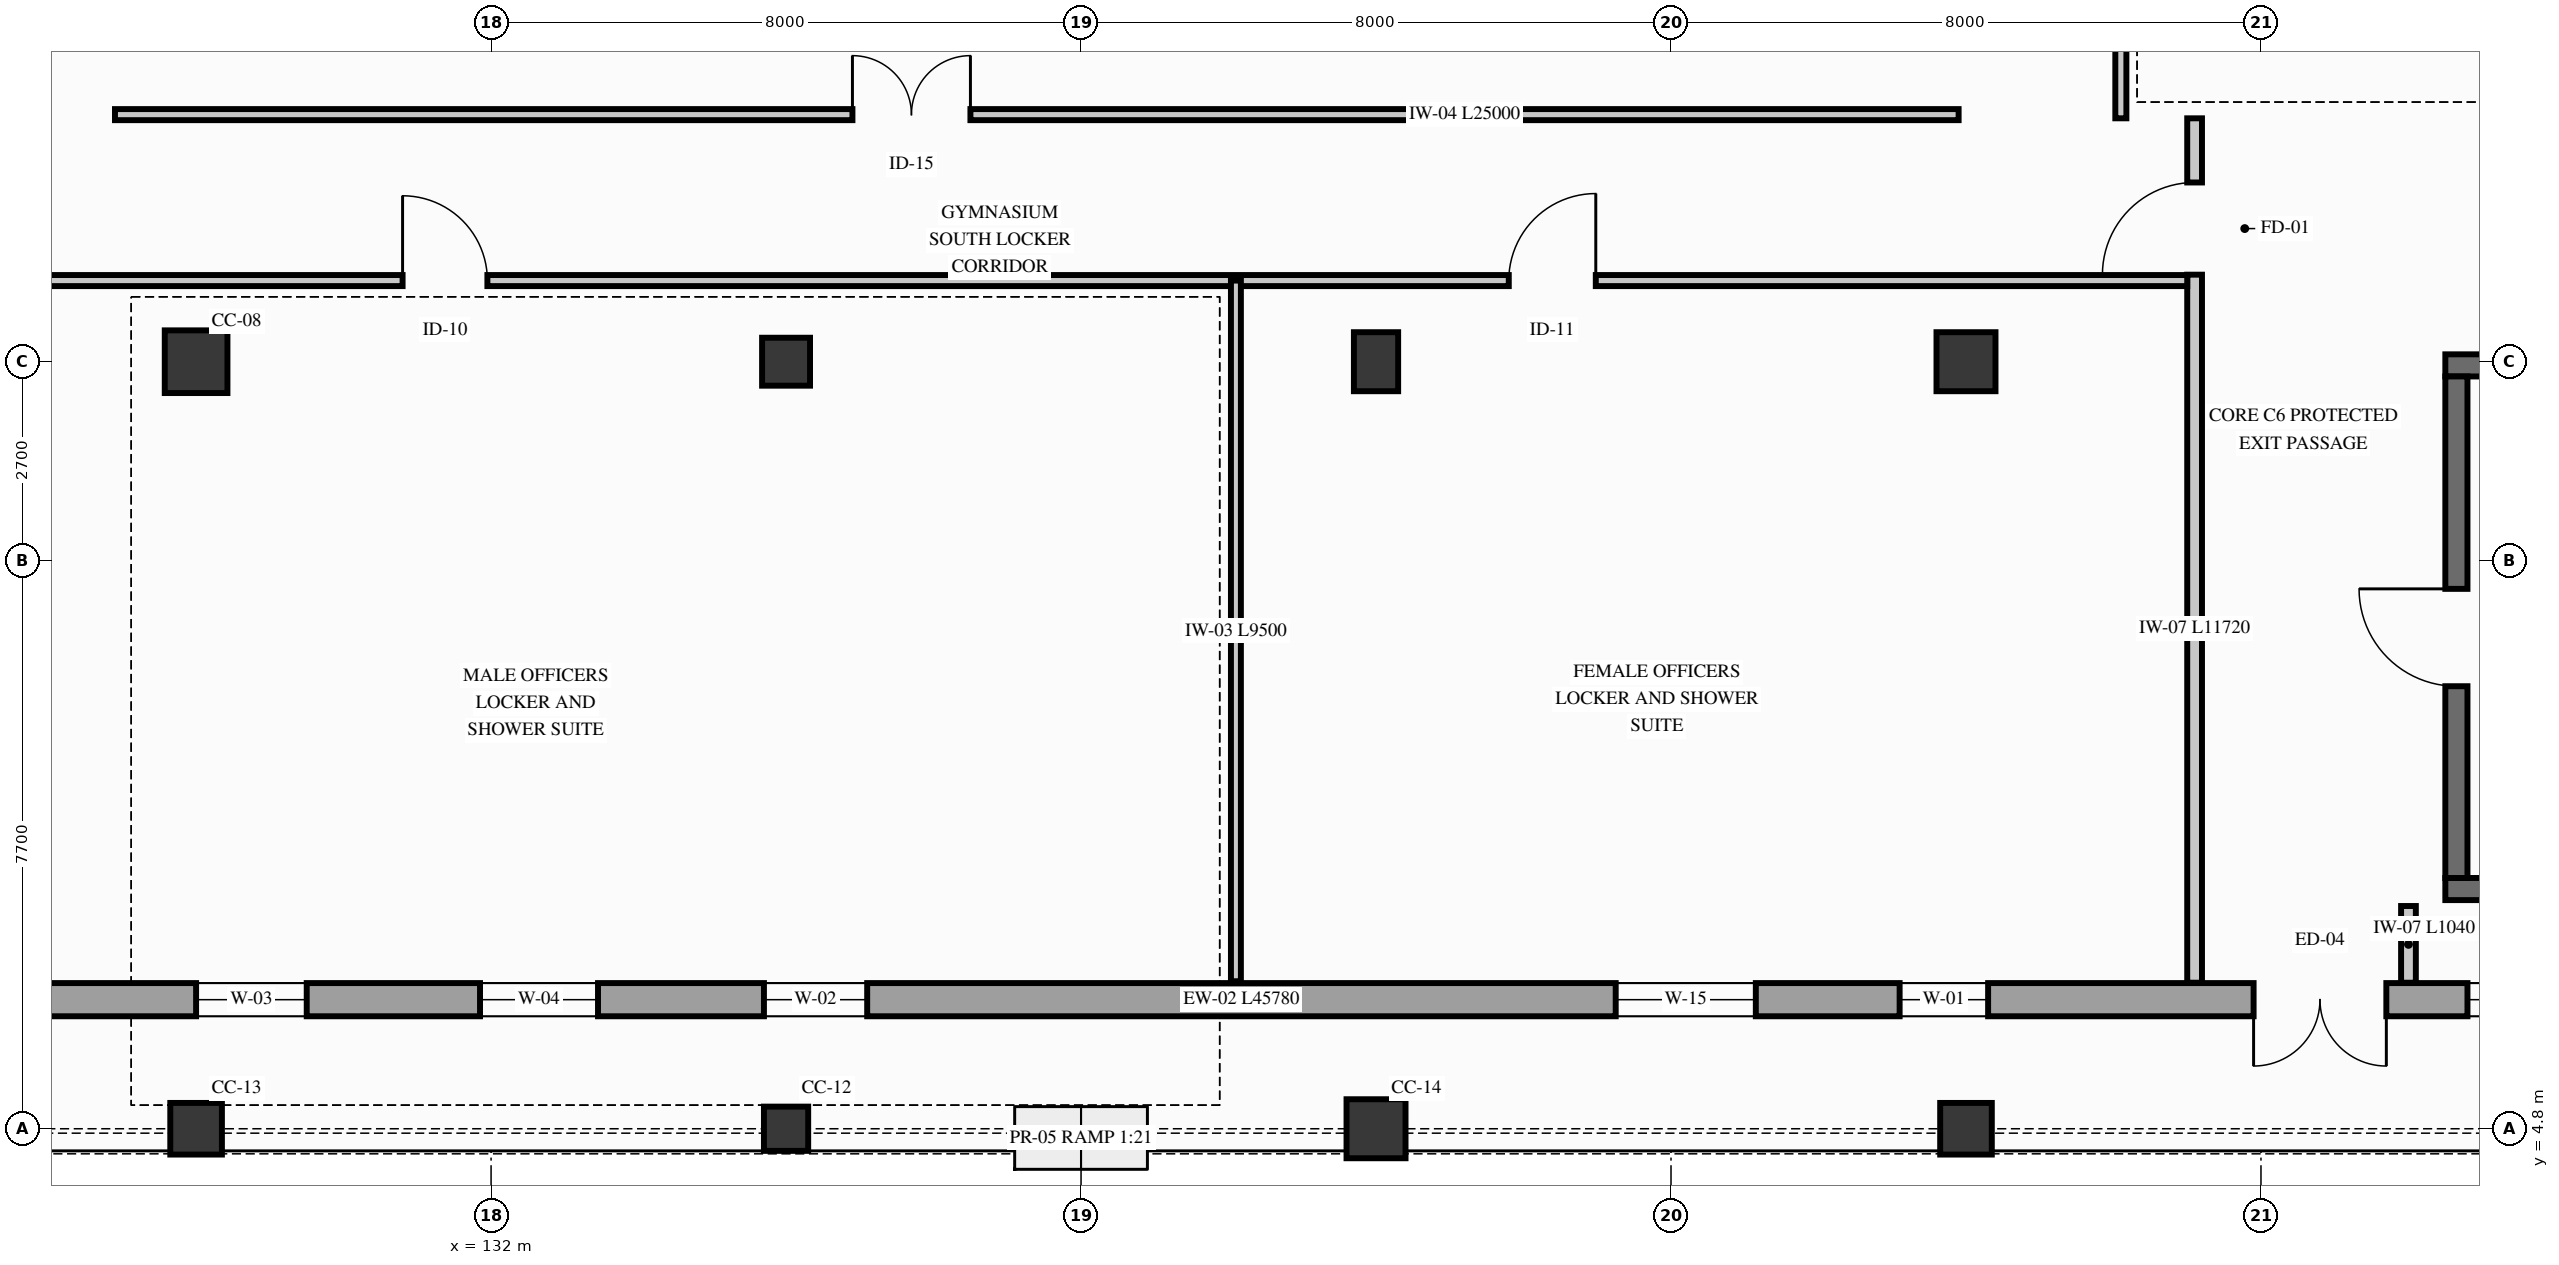
"""IFC4 building model, lengths in metres.
Left out: names, types, materials, properties, quantities, classifications, styles, units other than length and angle.
Written with IfcOpenShell. Run it as: python <this file> out.ifc"""

import sys

from ifc_helpers import new_model, si_unit, direction, frame, frame_2d, origin, origin_2d, place, context, subcontext, project, spatial, rectangle, circle, extrude, element, fill, save


model = new_model("IFC4")
c1 = context("Model", 3, precision=1e-05, world=origin(), true_north=direction((0.0, 1.0)))
c2 = subcontext(c1, "Body", "Model", "MODEL_VIEW")
j1 = project(units=[si_unit("LENGTHUNIT", "METRE"), si_unit("PLANEANGLEUNIT", "RADIAN")], contexts=[c1])
p1 = place(None, origin())
s1 = spatial("IfcSite", under=j1, at=p1, CompositionType="ELEMENT")
p2 = place(p1, origin())
s2 = spatial("IfcBuilding", under=s1, at=p2, CompositionType="ELEMENT")
p3 = place(p2, origin())
s3 = spatial("IfcBuildingStorey", under=s2, at=p3, CompositionType="ELEMENT", Elevation=0.0)
for number, where, z_axis, x_axis in (
    (1, (158.5, 8.05, 0.0), (0.0, 0.0, 1.0), (1.0, 0.0, 0.0)),
    (2, (158.5, 15.15, 0.0), (0.0, 0.0, 1.0), (1.0, 0.0, 0.0)),
):
    element("IfcWall", number, at=place(p3, frame(where, z_axis=z_axis, x_axis=x_axis)), inside=s3, PredefinedType="SHEAR", context=c2, shape_type="SweptSolid", body=[
        extrude(rectangle(XDim=8.2, YDim=0.3, at=frame_2d((4.1, 0.0))), origin(), (0.0, 0.0, 1.0), 4.88),
    ])
p4 = place(p3, frame((158.65, 8.2, 0.0), z_axis=(0.0, 0.0, 1.0), x_axis=(0.0, 1.0, 0.0)))
e3 = element("IfcWall", 3, at=p4, inside=s3, PredefinedType="SHEAR", context=c2, shape_type="SweptSolid", body=[
    extrude(rectangle(XDim=6.8, YDim=0.3, at=frame_2d((3.4, 0.0))), origin(), (0.0, 0.0, 1.0), 4.88),
])
p5 = place(p4, frame((2.6, 0.0, 0.0)))
e4 = element("IfcOpeningElement", 4, at=p5, cuts=e3, PredefinedType="OPENING", context=c2, shape_type="SweptSolid", body=[
    extrude(rectangle(XDim=1.32, YDim=2.24, at=frame_2d((0.66, 1.12))), frame((0.0, 0.16, 0.0), z_axis=(0.0, -1.0, 0.0), x_axis=(1.0, 0.0, 0.0)), (0.0, 0.0, 1.0), 0.32),
])
p6 = place(p3, frame((128.0, 4.8, 0.0), z_axis=(0.0, 0.0, 1.0), x_axis=(1.0, 0.0, 0.0)))
e5 = element("IfcColumn", 5, at=p6, inside=s3, PredefinedType="COLUMN", context=c2, shape_type="SweptSolid", body=[
    extrude(circle(Radius=0.35, at=origin_2d()), origin(), (0.0, 0.0, 1.0), 5.1),
])
p7 = place(p3, frame((128.0, 15.2, 0.0), z_axis=(0.0, 0.0, 1.0), x_axis=(1.0, 0.0, 0.0)))
e6 = element("IfcColumn", 6, at=p7, inside=s3, PredefinedType="COLUMN", context=c2, shape_type="SweptSolid", body=[
    extrude(rectangle(XDim=0.85, YDim=0.85, at=origin_2d()), origin(), (0.0, 0.0, 1.0), 5.1),
])
p8 = place(p3, frame((136.0, 4.8, 0.0), z_axis=(0.0, 0.0, 1.0), x_axis=(1.0, 0.0, 0.0)))
e7 = element("IfcColumn", 7, at=p8, inside=s3, PredefinedType="COLUMN", context=c2, shape_type="SweptSolid", body=[
    extrude(circle(Radius=0.3, at=origin_2d()), origin(), (0.0, 0.0, 1.0), 5.1),
])
p9 = place(p3, frame((136.0, 15.2, 0.0), z_axis=(0.0, 0.0, 1.0), x_axis=(1.0, 0.0, 0.0)))
e8 = element("IfcColumn", 8, at=p9, inside=s3, PredefinedType="COLUMN", context=c2, shape_type="SweptSolid", body=[
    extrude(rectangle(XDim=0.65, YDim=0.65, at=origin_2d()), origin(), (0.0, 0.0, 1.0), 5.1),
])
p10 = place(p3, frame((144.0, 4.8, 0.0), z_axis=(0.0, 0.0, 1.0), x_axis=(1.0, 0.0, 0.0)))
e9 = element("IfcColumn", 9, at=p10, inside=s3, PredefinedType="COLUMN", context=c2, shape_type="SweptSolid", body=[
    extrude(circle(Radius=0.4, at=origin_2d()), origin(), (0.0, 0.0, 1.0), 5.1),
])
p11 = place(p3, frame((144.0, 15.2, 0.0), z_axis=(0.0, 0.0, 1.0), x_axis=(1.0, 0.0, 0.0)))
e10 = element("IfcColumn", 10, at=p11, inside=s3, PredefinedType="COLUMN", context=c2, shape_type="SweptSolid", body=[
    extrude(rectangle(XDim=0.6, YDim=0.8, at=origin_2d()), origin(), (0.0, 0.0, 1.0), 5.1),
])
p12 = place(p3, frame((152.0, 4.8, 0.0), z_axis=(0.0, 0.0, 1.0), x_axis=(1.0, 0.0, 0.0)))
e11 = element("IfcColumn", 11, at=p12, inside=s3, PredefinedType="COLUMN", context=c2, shape_type="SweptSolid", body=[
    extrude(circle(Radius=0.35, at=origin_2d()), origin(), (0.0, 0.0, 1.0), 5.1),
])
p13 = place(p3, frame((152.0, 15.2, 0.0), z_axis=(0.0, 0.0, 1.0), x_axis=(1.0, 0.0, 0.0)))
e12 = element("IfcColumn", 12, at=p13, inside=s3, PredefinedType="COLUMN", context=c2, shape_type="SweptSolid", body=[
    extrude(rectangle(XDim=0.8, YDim=0.8, at=origin_2d()), origin(), (0.0, 0.0, 1.0), 5.1),
])
p14 = place(p3, frame((122.5, 6.55, 0.0), z_axis=(0.0, 0.0, 1.0), x_axis=(1.0, 0.0, 0.0)))
e13 = element("IfcWall", 13, at=p14, inside=s3, PredefinedType="SOLIDWALL", context=c2, shape_type="SweptSolid", body=[
    extrude(rectangle(XDim=45.78, YDim=0.45, at=frame_2d((22.89, 0.0))), origin(), (0.0, 0.0, 1.0), 4.328),
])
p15 = place(p14, frame((35.2, 0.0, 0.0), z_axis=(0.0, 0.0, 1.0), x_axis=(-1.0, 0.0, 0.0)))
e14 = element("IfcOpeningElement", 14, at=p15, cuts=e13, PredefinedType="OPENING", context=c2, shape_type="SweptSolid", body=[
    extrude(rectangle(XDim=1.8, YDim=2.4, at=frame_2d((0.9, 1.2))), frame((0.0, 0.235, 0.0), z_axis=(0.0, -1.0, 0.0), x_axis=(1.0, 0.0, 0.0)), (0.0, 0.0, 1.0), 0.47),
])
p16 = place(p14, frame((1.65, 0.0, 0.85)))
e15 = element("IfcOpeningElement", 15, at=p16, cuts=e13, PredefinedType="OPENING", context=c2, shape_type="SweptSolid", body=[
    extrude(rectangle(XDim=1.3, YDim=2.15, at=frame_2d((0.65, 1.075))), frame((0.0, 0.235, 0.0), z_axis=(0.0, -1.0, 0.0), x_axis=(1.0, 0.0, 0.0)), (0.0, 0.0, 1.0), 0.47),
])
p17 = place(p14, frame((5.5, 0.0, 0.85)))
e16 = element("IfcOpeningElement", 16, at=p17, cuts=e13, PredefinedType="OPENING", context=c2, shape_type="SweptSolid", body=[
    extrude(rectangle(XDim=1.5, YDim=2.3, at=frame_2d((0.75, 1.15))), frame((0.0, 0.235, 0.0), z_axis=(0.0, -1.0, 0.0), x_axis=(1.0, 0.0, 0.0)), (0.0, 0.0, 1.0), 0.47),
])
p18 = place(p14, frame((9.35, 0.0, 0.85)))
e17 = element("IfcOpeningElement", 17, at=p18, cuts=e13, PredefinedType="OPENING", context=c2, shape_type="SweptSolid", body=[
    extrude(rectangle(XDim=1.6, YDim=2.4, at=frame_2d((0.8, 1.2))), frame((0.0, 0.235, 0.0), z_axis=(0.0, -1.0, 0.0), x_axis=(1.0, 0.0, 0.0)), (0.0, 0.0, 1.0), 0.47),
])
p19 = place(p14, frame((13.2, 0.0, 0.85)))
e18 = element("IfcOpeningElement", 18, at=p19, cuts=e13, PredefinedType="OPENING", context=c2, shape_type="SweptSolid", body=[
    extrude(rectangle(XDim=1.4, YDim=2.2, at=frame_2d((0.7, 1.1))), frame((0.0, 0.235, 0.0), z_axis=(0.0, -1.0, 0.0), x_axis=(1.0, 0.0, 0.0)), (0.0, 0.0, 1.0), 0.47),
])
p20 = place(p14, frame((24.75, 0.0, 0.85)))
e19 = element("IfcOpeningElement", 19, at=p20, cuts=e13, PredefinedType="OPENING", context=c2, shape_type="SweptSolid", body=[
    extrude(rectangle(XDim=1.9, YDim=2.45, at=frame_2d((0.95, 1.225))), frame((0.0, 0.235, 0.0), z_axis=(0.0, -1.0, 0.0), x_axis=(1.0, 0.0, 0.0)), (0.0, 0.0, 1.0), 0.47),
])
p21 = place(p14, frame((28.6, 0.0, 0.85)))
e20 = element("IfcOpeningElement", 20, at=p21, cuts=e13, PredefinedType="OPENING", context=c2, shape_type="SweptSolid", body=[
    extrude(rectangle(XDim=1.2, YDim=2.1, at=frame_2d((0.6, 1.05))), frame((0.0, 0.235, 0.0), z_axis=(0.0, -1.0, 0.0), x_axis=(1.0, 0.0, 0.0)), (0.0, 0.0, 1.0), 0.47),
])
p22 = place(p14, frame((36.3, 0.0, 0.85)))
e21 = element("IfcOpeningElement", 21, at=p22, cuts=e13, PredefinedType="OPENING", context=c2, shape_type="SweptSolid", body=[
    extrude(rectangle(XDim=2.1, YDim=2.55, at=frame_2d((1.05, 1.275))), frame((0.0, 0.235, 0.0), z_axis=(0.0, -1.0, 0.0), x_axis=(1.0, 0.0, 0.0)), (0.0, 0.0, 1.0), 0.47),
])
p23 = place(p14, frame((40.15, 0.0, 0.85)))
e22 = element("IfcOpeningElement", 22, at=p23, cuts=e13, PredefinedType="OPENING", context=c2, shape_type="SweptSolid", body=[
    extrude(rectangle(XDim=2.3, YDim=2.55, at=frame_2d((1.15, 1.275))), frame((0.0, 0.235, 0.0), z_axis=(0.0, -1.0, 0.0), x_axis=(1.0, 0.0, 0.0)), (0.0, 0.0, 1.0), 0.47),
])
p24 = place(p3, frame((155.1, 6.78, 0.0), z_axis=(0.0, 0.0, 1.0), x_axis=(0.0, 1.0, 0.0)))
e23 = element("IfcWall", 23, at=p24, inside=s3, PredefinedType="PARTITIONING", context=c2, shape_type="SweptSolid", body=[
    extrude(rectangle(XDim=11.72, YDim=0.2, at=frame_2d((5.86, 0.0))), origin(), (0.0, 0.0, 1.0), 4.368),
])
p25 = place(p24, frame((9.6, 0.0, 0.0)))
e24 = element("IfcOpeningElement", 24, at=p25, cuts=e23, PredefinedType="OPENING", context=c2, shape_type="SweptSolid", body=[
    extrude(rectangle(XDim=1.25, YDim=2.2, at=frame_2d((0.625, 1.1))), frame((0.0, 0.11, 0.0), z_axis=(0.0, -1.0, 0.0), x_axis=(1.0, 0.0, 0.0)), (0.0, 0.0, 1.0), 0.22),
])
p26 = place(p3, frame((158.0, 6.78, 0.0), z_axis=(0.0, 0.0, 1.0), x_axis=(0.0, 1.0, 0.0)))
e25 = element("IfcWall", 25, at=p26, inside=s3, PredefinedType="PARTITIONING", context=c2, shape_type="SweptSolid", body=[
    extrude(rectangle(XDim=1.04, YDim=0.2, at=frame_2d((0.52, 0.0))), origin(), (0.0, 0.0, 1.0), 4.86),
])
p27 = place(p3, frame((122.8, 16.3, 0.0), z_axis=(0.0, 0.0, 1.0), x_axis=(1.0, 0.0, 0.0)))
e26 = element("IfcWall", 26, at=p27, inside=s3, PredefinedType="PARTITIONING", context=c2, shape_type="SweptSolid", body=[
    extrude(rectangle(XDim=32.2, YDim=0.15, at=frame_2d((16.1, 0.0))), origin(), (0.0, 0.0, 1.0), 4.328),
])
p28 = place(p27, frame((8.0, 0.0, 0.0)))
e27 = element("IfcOpeningElement", 27, at=p28, cuts=e26, PredefinedType="OPENING", context=c2, shape_type="SweptSolid", body=[
    extrude(rectangle(XDim=1.15, YDim=2.2, at=frame_2d((0.575, 1.1))), frame((0.0, 0.085, 0.0), z_axis=(0.0, -1.0, 0.0), x_axis=(1.0, 0.0, 0.0)), (0.0, 0.0, 1.0), 0.17),
])
p29 = place(p27, frame((23.0, 0.0, 0.0)))
e28 = element("IfcOpeningElement", 28, at=p29, cuts=e26, PredefinedType="OPENING", context=c2, shape_type="SweptSolid", body=[
    extrude(rectangle(XDim=1.18, YDim=2.24, at=frame_2d((0.59, 1.12))), frame((0.0, 0.085, 0.0), z_axis=(0.0, -1.0, 0.0), x_axis=(1.0, 0.0, 0.0)), (0.0, 0.0, 1.0), 0.17),
])
p30 = place(p3, frame((126.9, 18.55, 0.0), z_axis=(0.0, 0.0, 1.0), x_axis=(1.0, 0.0, 0.0)))
e29 = element("IfcWall", 29, at=p30, inside=s3, PredefinedType="PARTITIONING", context=c2, shape_type="SweptSolid", body=[
    extrude(rectangle(XDim=25.0, YDim=0.15, at=frame_2d((12.5, 0.0))), origin(), (0.0, 0.0, 1.0), 4.86),
])
p31 = place(p30, frame((10.0, 0.0, 0.0)))
e30 = element("IfcOpeningElement", 30, at=p31, cuts=e29, PredefinedType="OPENING", context=c2, shape_type="SweptSolid", body=[
    extrude(rectangle(XDim=1.6, YDim=2.3, at=frame_2d((0.8, 1.15))), frame((0.0, 0.085, 0.0), z_axis=(0.0, -1.0, 0.0), x_axis=(1.0, 0.0, 0.0)), (0.0, 0.0, 1.0), 0.17),
])
p32 = place(p3, frame((142.1, 6.8, 0.0), z_axis=(0.0, 0.0, 1.0), x_axis=(0.0, 1.0, 0.0)))
e31 = element("IfcWall", 31, at=p32, inside=s3, PredefinedType="PARTITIONING", context=c2, shape_type="SweptSolid", body=[
    extrude(rectangle(XDim=9.5, YDim=0.135, at=frame_2d((4.75, 0.0))), origin(), (0.0, 0.0, 1.0), 4.86),
])
p33 = place(p3, frame((154.1, 18.5, 0.0), z_axis=(0.0, 0.0, 1.0), x_axis=(0.0, 1.0, 0.0)))
e32 = element("IfcWall", 32, at=p33, inside=s3, PredefinedType="PARTITIONING", context=c2, shape_type="SweptSolid", body=[
    extrude(rectangle(XDim=14.8, YDim=0.15, at=frame_2d((7.4, 0.0))), origin(), (0.0, 0.0, 1.0), 4.86),
])
p34 = place(p33, frame((6.0, 0.0, 0.0)))
e33 = element("IfcOpeningElement", 33, at=p34, cuts=e32, PredefinedType="OPENING", context=c2, shape_type="SweptSolid", body=[
    extrude(rectangle(XDim=1.12, YDim=2.2, at=frame_2d((0.56, 1.1))), frame((0.0, 0.085, 0.0), z_axis=(0.0, -1.0, 0.0), x_axis=(1.0, 0.0, 0.0)), (0.0, 0.0, 1.0), 0.17),
])
p35 = place(p15, origin())
e34 = element("IfcDoor", 34, at=p35, inside=s3, OperationType="DOUBLE_DOOR_SINGLE_SWING", PredefinedType="DOOR", context=c2, shape_type="SweptSolid", body=[
    extrude(rectangle(XDim=1.8, YDim=2.4, at=frame_2d((0.9, 1.2))), frame((0.0, 0.025, 0.0), z_axis=(0.0, -1.0, 0.0), x_axis=(1.0, 0.0, 0.0)), (0.0, 0.0, 1.0), 0.05),
])
fill(e14, e34)
p36 = place(p17, origin())
e35 = element("IfcWindow", 35, at=p36, inside=s3, PartitioningType="SINGLE_PANEL", PredefinedType="WINDOW", context=c2, shape_type="SweptSolid", body=[
    extrude(rectangle(XDim=1.5, YDim=2.3, at=frame_2d((0.75, 1.15))), frame((0.0, 0.03, 0.0), z_axis=(0.0, -1.0, 0.0), x_axis=(1.0, 0.0, 0.0)), (0.0, 0.0, 1.0), 0.06),
])
fill(e16, e35)
p37 = place(p18, origin())
e36 = element("IfcWindow", 36, at=p37, inside=s3, PartitioningType="SINGLE_PANEL", PredefinedType="WINDOW", context=c2, shape_type="SweptSolid", body=[
    extrude(rectangle(XDim=1.6, YDim=2.4, at=frame_2d((0.8, 1.2))), frame((0.0, 0.03, 0.0), z_axis=(0.0, -1.0, 0.0), x_axis=(1.0, 0.0, 0.0)), (0.0, 0.0, 1.0), 0.06),
])
fill(e17, e36)
p38 = place(p19, origin())
e37 = element("IfcWindow", 37, at=p38, inside=s3, PartitioningType="SINGLE_PANEL", PredefinedType="WINDOW", context=c2, shape_type="SweptSolid", body=[
    extrude(rectangle(XDim=1.4, YDim=2.2, at=frame_2d((0.7, 1.1))), frame((0.0, 0.03, 0.0), z_axis=(0.0, -1.0, 0.0), x_axis=(1.0, 0.0, 0.0)), (0.0, 0.0, 1.0), 0.06),
])
fill(e18, e37)
p39 = place(p20, origin())
e38 = element("IfcWindow", 38, at=p39, inside=s3, PartitioningType="SINGLE_PANEL", PredefinedType="WINDOW", context=c2, shape_type="SweptSolid", body=[
    extrude(rectangle(XDim=1.9, YDim=2.45, at=frame_2d((0.95, 1.225))), frame((0.0, 0.03, 0.0), z_axis=(0.0, -1.0, 0.0), x_axis=(1.0, 0.0, 0.0)), (0.0, 0.0, 1.0), 0.06),
])
fill(e19, e38)
p40 = place(p21, origin())
e39 = element("IfcWindow", 39, at=p40, inside=s3, PartitioningType="SINGLE_PANEL", PredefinedType="WINDOW", context=c2, shape_type="SweptSolid", body=[
    extrude(rectangle(XDim=1.2, YDim=2.1, at=frame_2d((0.6, 1.05))), frame((0.0, 0.03, 0.0), z_axis=(0.0, -1.0, 0.0), x_axis=(1.0, 0.0, 0.0)), (0.0, 0.0, 1.0), 0.06),
])
fill(e20, e39)
p41 = place(p22, origin())
e40 = element("IfcWindow", 40, at=p41, inside=s3, PartitioningType="SINGLE_PANEL", PredefinedType="WINDOW", context=c2, shape_type="SweptSolid", body=[
    extrude(rectangle(XDim=2.1, YDim=2.55, at=frame_2d((1.05, 1.275))), frame((0.0, 0.03, 0.0), z_axis=(0.0, -1.0, 0.0), x_axis=(1.0, 0.0, 0.0)), (0.0, 0.0, 1.0), 0.06),
])
fill(e21, e40)
p42 = place(p5, origin())
e41 = element("IfcDoor", 41, at=p42, inside=s3, OperationType="SINGLE_SWING_RIGHT", PredefinedType="DOOR", context=c2, shape_type="SweptSolid", body=[
    extrude(rectangle(XDim=1.32, YDim=2.24, at=frame_2d((0.66, 1.12))), frame((0.0, 0.025, 0.0), z_axis=(0.0, -1.0, 0.0), x_axis=(1.0, 0.0, 0.0)), (0.0, 0.0, 1.0), 0.05),
])
fill(e4, e41)
p43 = place(p25, origin())
e42 = element("IfcDoor", 42, at=p43, inside=s3, OperationType="SINGLE_SWING_LEFT", PredefinedType="DOOR", context=c2, shape_type="SweptSolid", body=[
    extrude(rectangle(XDim=1.25, YDim=2.2, at=frame_2d((0.625, 1.1))), frame((0.0, 0.025, 0.0), z_axis=(0.0, -1.0, 0.0), x_axis=(1.0, 0.0, 0.0)), (0.0, 0.0, 1.0), 0.05),
])
fill(e24, e42)
p44 = place(p28, origin())
e43 = element("IfcDoor", 43, at=p44, inside=s3, OperationType="SINGLE_SWING_LEFT", PredefinedType="DOOR", context=c2, shape_type="SweptSolid", body=[
    extrude(rectangle(XDim=1.15, YDim=2.2, at=frame_2d((0.575, 1.1))), frame((0.0, 0.025, 0.0), z_axis=(0.0, -1.0, 0.0), x_axis=(1.0, 0.0, 0.0)), (0.0, 0.0, 1.0), 0.05),
])
fill(e27, e43)
p45 = place(p29, origin())
e44 = element("IfcDoor", 44, at=p45, inside=s3, OperationType="SINGLE_SWING_RIGHT", PredefinedType="DOOR", context=c2, shape_type="SweptSolid", body=[
    extrude(rectangle(XDim=1.18, YDim=2.24, at=frame_2d((0.59, 1.12))), frame((0.0, 0.025, 0.0), z_axis=(0.0, -1.0, 0.0), x_axis=(1.0, 0.0, 0.0)), (0.0, 0.0, 1.0), 0.05),
])
fill(e28, e44)
p46 = place(p31, origin())
e45 = element("IfcDoor", 45, at=p46, inside=s3, OperationType="DOUBLE_DOOR_SINGLE_SWING", PredefinedType="DOOR", context=c2, shape_type="SweptSolid", body=[
    extrude(rectangle(XDim=1.6, YDim=2.3, at=frame_2d((0.8, 1.15))), frame((0.0, 0.025, 0.0), z_axis=(0.0, -1.0, 0.0), x_axis=(1.0, 0.0, 0.0)), (0.0, 0.0, 1.0), 0.05),
])
fill(e30, e45)
save(model, sys.argv[1])
